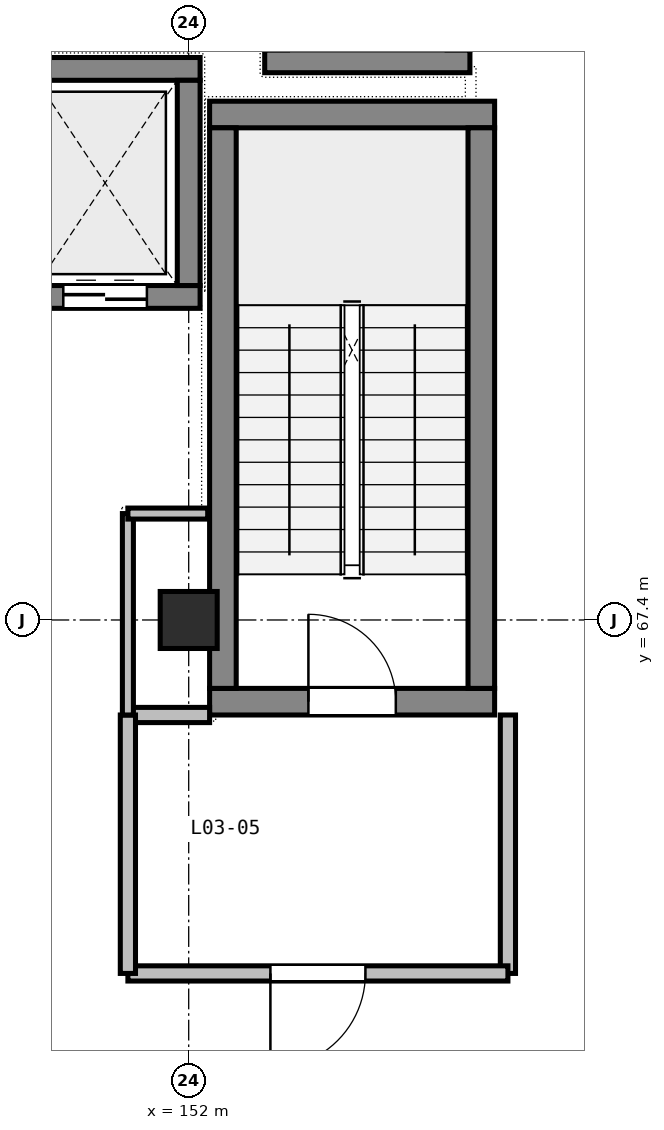
"""IFC4 building model, lengths in metres.
Left out: names, types, materials, properties, quantities, classifications, styles, units other than length and angle.
Written with IfcOpenShell. Run it as: python <this file> out.ifc"""

import sys

from ifc_helpers import new_model, si_unit, direction, frame, frame_2d, origin, origin_2d, place, context, subcontext, project, spatial, rectangle, extrude, element, fill, save


model = new_model("IFC4")
c1 = context("Model", 3, precision=1e-05, world=origin(), true_north=direction((0.0, 1.0)))
c2 = subcontext(c1, "Body", "Model", "MODEL_VIEW")
j1 = project(units=[si_unit("LENGTHUNIT", "METRE"), si_unit("PLANEANGLEUNIT", "RADIAN")], contexts=[c1])
p1 = place(None, origin())
s1 = spatial("IfcSite", under=j1, at=p1, CompositionType="ELEMENT")
p2 = place(p1, origin())
s2 = spatial("IfcBuilding", under=s1, at=p2, CompositionType="ELEMENT")
p3 = place(p2, frame((0.0, 0.0, 15.0)))
s3 = spatial("IfcBuildingStorey", under=s2, at=p3, CompositionType="ELEMENT", Elevation=15.0)
p4 = place(p3, frame((152.0, 67.4, 0.0), z_axis=(0.0, 0.0, 1.0), x_axis=(1.0, 0.0, 0.0)))
e1 = element("IfcColumn", 1, at=p4, inside=s3, PredefinedType="COLUMN", context=c2, shape_type="SweptSolid", body=[
    extrude(rectangle(XDim=0.75, YDim=0.75, at=origin_2d()), origin(), (0.0, 0.0, 1.0), 4.5),
])
p5 = place(p3, frame((152.275, 66.325, 0.0), z_axis=(0.0, 0.0, 1.0), x_axis=(1.0, 0.0, 0.0)))
e2 = element("IfcWall", 2, at=p5, inside=s3, PredefinedType="SHEAR", context=c2, shape_type="SweptSolid", body=[
    extrude(rectangle(XDim=3.75, YDim=0.35, at=frame_2d((1.875, 0.0))), origin(), (0.0, 0.0, 1.0), 4.5),
])
p6 = place(p5, frame((1.3, 0.0, 0.0)))
e3 = element("IfcOpeningElement", 3, at=p6, cuts=e2, PredefinedType="OPENING", context=c2, shape_type="SweptSolid", body=[
    extrude(rectangle(XDim=1.15, YDim=2.15, at=frame_2d((0.575, 1.075))), frame((0.0, 0.185, 0.0), z_axis=(0.0, -1.0, 0.0), x_axis=(1.0, 0.0, 0.0)), (0.0, 0.0, 1.0), 0.37),
])
p7 = place(p3, frame((152.275, 74.05, 0.0), z_axis=(0.0, 0.0, 1.0), x_axis=(1.0, 0.0, 0.0)))
e4 = element("IfcWall", 4, at=p7, inside=s3, PredefinedType="SHEAR", context=c2, shape_type="SweptSolid", body=[
    extrude(rectangle(XDim=3.75, YDim=0.35, at=frame_2d((1.875, 0.0))), origin(), (0.0, 0.0, 1.0), 4.5),
])
for number, where, z_axis, x_axis in (
    (5, (152.45, 66.5, 0.0), (0.0, 0.0, 1.0), (0.0, 1.0, 0.0)),
    (6, (155.85, 66.5, 0.0), (0.0, 0.0, 1.0), (0.0, 1.0, 0.0)),
):
    element("IfcWall", number, at=place(p3, frame(where, z_axis=z_axis, x_axis=x_axis)), inside=s3, PredefinedType="SHEAR", context=c2, shape_type="SweptSolid", body=[
        extrude(rectangle(XDim=7.375, YDim=0.35, at=frame_2d((3.688, 0.0))), origin(), (0.0, 0.0, 1.0), 4.5),
    ])
p8 = place(p3, frame((149.65, 71.65, 0.0), z_axis=(0.0, 0.0, 1.0), x_axis=(1.0, 0.0, 0.0)))
e7 = element("IfcWall", 7, at=p8, inside=s3, PredefinedType="SHEAR", context=c2, shape_type="SweptSolid", body=[
    extrude(rectangle(XDim=2.5, YDim=0.3, at=frame_2d((1.25, 0.0))), origin(), (0.0, 0.0, 1.0), 4.5),
])
p9 = place(p8, frame((0.7, 0.0, 0.0)))
e8 = element("IfcOpeningElement", 8, at=p9, cuts=e7, PredefinedType="OPENING", context=c2, shape_type="SweptSolid", body=[
    extrude(rectangle(XDim=1.1, YDim=2.1, at=frame_2d((0.55, 1.05))), frame((0.0, 0.16, 0.0), z_axis=(0.0, -1.0, 0.0), x_axis=(1.0, 0.0, 0.0)), (0.0, 0.0, 1.0), 0.32),
])
p10 = place(p3, frame((149.65, 74.65, 0.0), z_axis=(0.0, 0.0, 1.0), x_axis=(1.0, 0.0, 0.0)))
e9 = element("IfcWall", 9, at=p10, inside=s3, PredefinedType="SHEAR", context=c2, shape_type="SweptSolid", body=[
    extrude(rectangle(XDim=2.5, YDim=0.3, at=frame_2d((1.25, 0.0))), origin(), (0.0, 0.0, 1.0), 4.5),
])
for number, where, z_axis, x_axis in (
    (10, (152.0, 71.8, 0.0), (0.0, 0.0, 1.0), (0.0, 1.0, 0.0)),
    (11, (153.0, 74.75, 0.0), (0.0, 0.0, 1.0), (1.0, 0.0, 0.0)),
):
    element("IfcWall", number, at=place(p3, frame(where, z_axis=z_axis, x_axis=x_axis)), inside=s3, PredefinedType="SHEAR", context=c2, shape_type="SweptSolid", body=[
        extrude(rectangle(XDim=2.7, YDim=0.3, at=frame_2d((1.35, 0.0))), origin(), (0.0, 0.0, 1.0), 4.5),
    ])
p11 = place(p3, frame((151.2, 66.15, 0.0), z_axis=(0.0, 0.0, 1.0), x_axis=(1.0, 0.0, 0.0)))
e12 = element("IfcWall", 12, at=p11, inside=s3, PredefinedType="PARTITIONING", context=c2, shape_type="SweptSolid", body=[
    extrude(rectangle(XDim=1.075, YDim=0.2, at=frame_2d((0.538, 0.0))), origin(), (0.0, 0.0, 1.0), 3.735),
])
p12 = place(p3, frame((156.2, 66.15, 0.0), z_axis=(0.0, 0.0, 1.0), x_axis=(0.0, -1.0, 0.0)))
e13 = element("IfcWall", 13, at=p12, inside=s3, PredefinedType="PARTITIONING", context=c2, shape_type="SweptSolid", body=[
    extrude(rectangle(XDim=3.4, YDim=0.2, at=frame_2d((1.7, 0.0))), origin(), (0.0, 0.0, 1.0), 4.195),
])
p13 = place(p3, frame((156.2, 62.75, 0.0), z_axis=(0.0, 0.0, 1.0), x_axis=(-1.0, 0.0, 0.0)))
e14 = element("IfcWall", 14, at=p13, inside=s3, PredefinedType="PARTITIONING", context=c2, shape_type="SweptSolid", body=[
    extrude(rectangle(XDim=5.0, YDim=0.2, at=frame_2d((2.5, 0.0))), origin(), (0.0, 0.0, 1.0), 3.735),
])
p14 = place(p13, frame((1.875, 0.0, 0.0)))
e15 = element("IfcOpeningElement", 15, at=p14, cuts=e14, PredefinedType="OPENING", context=c2, shape_type="SweptSolid", body=[
    extrude(rectangle(XDim=1.25, YDim=2.15, at=frame_2d((0.625, 1.075))), frame((0.0, 0.11, 0.0), z_axis=(0.0, -1.0, 0.0), x_axis=(1.0, 0.0, 0.0)), (0.0, 0.0, 1.0), 0.22),
])
p15 = place(p3, frame((151.2, 62.75, 0.0), z_axis=(0.0, 0.0, 1.0), x_axis=(0.0, 1.0, 0.0)))
e16 = element("IfcWall", 16, at=p15, inside=s3, PredefinedType="PARTITIONING", context=c2, shape_type="SweptSolid", body=[
    extrude(rectangle(XDim=3.4, YDim=0.2, at=frame_2d((1.7, 0.0))), origin(), (0.0, 0.0, 1.0), 4.195),
])
p16 = place(p3, frame((151.2, 66.15, 0.0), z_axis=(0.0, 0.0, 1.0), x_axis=(0.0, 1.0, 0.0)))
e17 = element("IfcWall", 17, at=p16, inside=s3, PredefinedType="PARTITIONING", context=c2, shape_type="SweptSolid", body=[
    extrude(rectangle(XDim=2.65, YDim=0.145, at=frame_2d((1.325, 0.0))), origin(), (0.0, 0.0, 1.0), 3.835),
])
p17 = place(p3, frame((151.2, 68.8, 0.0), z_axis=(0.0, 0.0, 1.0), x_axis=(1.0, 0.0, 0.0)))
e18 = element("IfcWall", 18, at=p17, inside=s3, PredefinedType="PARTITIONING", context=c2, shape_type="SweptSolid", body=[
    extrude(rectangle(XDim=1.05, YDim=0.145, at=frame_2d((0.525, 0.0))), origin(), (0.0, 0.0, 1.0), 3.735),
])
p18 = place(p6, origin())
e19 = element("IfcDoor", 19, at=p18, inside=s3, OperationType="SINGLE_SWING_LEFT", PredefinedType="DOOR", context=c2, shape_type="SweptSolid", body=[
    extrude(rectangle(XDim=1.15, YDim=2.15, at=frame_2d((0.575, 1.075))), frame((0.0, 0.025, 0.0), z_axis=(0.0, -1.0, 0.0), x_axis=(1.0, 0.0, 0.0)), (0.0, 0.0, 1.0), 0.05),
])
fill(e3, e19)
p19 = place(p9, origin())
e20 = element("IfcDoor", 20, at=p19, inside=s3, OperationType="DOUBLE_DOOR_SLIDING", PredefinedType="DOOR", context=c2, shape_type="SweptSolid", body=[
    extrude(rectangle(XDim=1.1, YDim=2.1, at=frame_2d((0.55, 1.05))), frame((0.0, 0.025, 0.0), z_axis=(0.0, -1.0, 0.0), x_axis=(1.0, 0.0, 0.0)), (0.0, 0.0, 1.0), 0.05),
])
fill(e8, e20)
p20 = place(p14, origin())
e21 = element("IfcDoor", 21, at=p20, inside=s3, OperationType="SINGLE_SWING_RIGHT", PredefinedType="DOOR", context=c2, shape_type="SweptSolid", body=[
    extrude(rectangle(XDim=1.25, YDim=2.15, at=frame_2d((0.625, 1.075))), frame((0.0, 0.025, 0.0), z_axis=(0.0, -1.0, 0.0), x_axis=(1.0, 0.0, 0.0)), (0.0, 0.0, 1.0), 0.05),
])
fill(e15, e21)
save(model, sys.argv[1])
